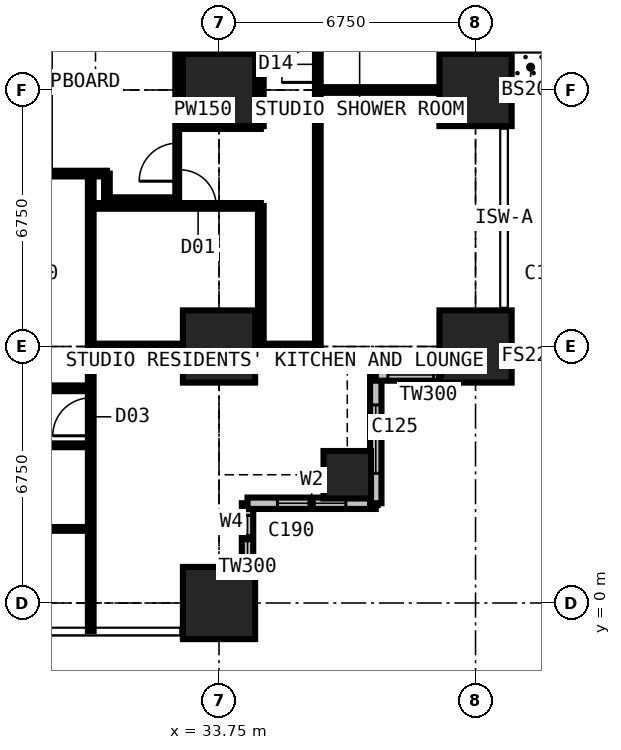
"""IFC4 building model, lengths in metres.
Left out: names, types, materials, properties, quantities, classifications, styles, units other than length and angle.
Written with IfcOpenShell. Run it as: python <this file> out.ifc"""

import sys

from ifc_helpers import new_model, si_unit, direction, frame, frame_2d, origin, origin_2d, place, context, subcontext, project, spatial, rectangle, extrude, element, fill, save


model = new_model("IFC4")
c1 = context("Model", 3, precision=1e-05, world=origin(), true_north=direction((0.0, 1.0)))
c2 = subcontext(c1, "Body", "Model", "MODEL_VIEW")
j1 = project(units=[si_unit("LENGTHUNIT", "METRE"), si_unit("PLANEANGLEUNIT", "RADIAN")], contexts=[c1])
p1 = place(None, origin())
s1 = spatial("IfcSite", under=j1, at=p1, CompositionType="ELEMENT")
p2 = place(p1, origin())
s2 = spatial("IfcBuilding", under=s1, at=p2, CompositionType="ELEMENT")
p3 = place(p2, frame((0.0, 0.0, 18.0)))
s3 = spatial("IfcBuildingStorey", under=s2, at=p3, CompositionType="ELEMENT", Elevation=18.0)
for number, where, z_axis, x_axis in (
    (1, (33.75, 0.0, 0.0), (0.0, 0.0, 1.0), (1.0, 0.0, 0.0)),
    (2, (33.75, 6.75, 0.0), (0.0, 0.0, 1.0), (1.0, 0.0, 0.0)),
    (3, (33.75, 13.5, 0.0), (0.0, 0.0, 1.0), (1.0, 0.0, 0.0)),
):
    element("IfcColumn", number, at=place(p3, frame(where, z_axis=z_axis, x_axis=x_axis)), inside=s3, PredefinedType="COLUMN", context=c2, shape_type="SweptSolid", body=[
        extrude(rectangle(XDim=1.9, YDim=1.9, at=origin_2d()), origin(), (0.0, 0.0, 1.0), 3.6),
    ])
p4 = place(p3, frame((37.125, 3.375, 0.0), z_axis=(0.0, 0.0, 1.0), x_axis=(1.0, 0.0, 0.0)))
e4 = element("IfcColumn", 4, at=p4, inside=s3, PredefinedType="COLUMN", context=c2, shape_type="SweptSolid", body=[
    extrude(rectangle(XDim=1.25, YDim=1.25, at=origin_2d()), origin(), (0.0, 0.0, 1.0), 3.6),
])
for number, where, z_axis, x_axis in (
    (5, (40.5, 6.75, 0.0), (0.0, 0.0, 1.0), (1.0, 0.0, 0.0)),
    (6, (40.5, 13.5, 0.0), (0.0, 0.0, 1.0), (1.0, 0.0, 0.0)),
):
    element("IfcColumn", number, at=place(p3, frame(where, z_axis=z_axis, x_axis=x_axis)), inside=s3, PredefinedType="COLUMN", context=c2, shape_type="SweptSolid", body=[
        extrude(rectangle(XDim=1.9, YDim=1.9, at=origin_2d()), origin(), (0.0, 0.0, 1.0), 3.6),
    ])
p5 = place(p3, frame((41.25, 20.25, 0.0), z_axis=(0.0, 0.0, 1.0), x_axis=(0.0, -1.0, 0.0)))
e7 = element("IfcWall", 7, at=p5, inside=s3, PredefinedType="SOLIDWALL", context=c2, shape_type="SweptSolid", body=[
    extrude(rectangle(XDim=6.75, YDim=0.15, at=frame_2d((3.375, 0.0))), origin(), (0.0, 0.0, 1.0), 3.375),
])
p6 = place(p5, frame((0.996, 0.0, 0.0)))
e8 = element("IfcOpeningElement", 8, at=p6, cuts=e7, PredefinedType="OPENING", context=c2, shape_type="SweptSolid", body=[
    extrude(rectangle(XDim=1.0, YDim=2.2, at=frame_2d((0.5, 1.1))), frame((0.0, 0.085, 0.0), z_axis=(0.0, -1.0, 0.0), x_axis=(1.0, 0.0, 0.0)), (0.0, 0.0, 1.0), 0.17),
])
p7 = place(p5, frame((2.042, 0.0, 0.9)))
e9 = element("IfcOpeningElement", 9, at=p7, cuts=e7, PredefinedType="OPENING", context=c2, shape_type="SweptSolid", body=[
    extrude(rectangle(XDim=1.2, YDim=1.8, at=frame_2d((0.6, 0.9))), frame((0.0, 0.085, 0.0), z_axis=(0.0, -1.0, 0.0), x_axis=(1.0, 0.0, 0.0)), (0.0, 0.0, 1.0), 0.17),
])
p8 = place(p5, frame((4.754, 0.0, 0.0)))
e10 = element("IfcOpeningElement", 10, at=p8, cuts=e7, PredefinedType="OPENING", context=c2, shape_type="SweptSolid", body=[
    extrude(rectangle(XDim=1.0, YDim=2.2, at=frame_2d((0.5, 1.1))), frame((0.0, 0.085, 0.0), z_axis=(0.0, -1.0, 0.0), x_axis=(1.0, 0.0, 0.0)), (0.0, 0.0, 1.0), 0.17),
])
p9 = place(p5, frame((3.508, 0.0, 0.9)))
e11 = element("IfcOpeningElement", 11, at=p9, cuts=e7, PredefinedType="OPENING", context=c2, shape_type="SweptSolid", body=[
    extrude(rectangle(XDim=1.2, YDim=1.8, at=frame_2d((0.6, 0.9))), frame((0.0, 0.085, 0.0), z_axis=(0.0, -1.0, 0.0), x_axis=(1.0, 0.0, 0.0)), (0.0, 0.0, 1.0), 0.17),
])
p10 = place(p3, frame((34.5, -0.75, 0.0), z_axis=(0.0, 0.0, 1.0), x_axis=(0.0, 1.0, 0.0)))
e12 = element("IfcWall", 12, at=p10, inside=s3, PredefinedType="SOLIDWALL", context=c2, shape_type="SweptSolid", body=[
    extrude(rectangle(XDim=3.375, YDim=0.3, at=frame_2d((1.688, 0.0))), origin(), (0.0, 0.0, 1.0), 3.375),
])
p11 = place(p10, frame((1.857, 0.0, 0.9)))
e13 = element("IfcOpeningElement", 13, at=p11, cuts=e12, PredefinedType="OPENING", context=c2, shape_type="SweptSolid", body=[
    extrude(rectangle(XDim=1.2, YDim=1.8, at=frame_2d((0.6, 0.9))), frame((0.0, 0.16, 0.0), z_axis=(0.0, -1.0, 0.0), x_axis=(1.0, 0.0, 0.0)), (0.0, 0.0, 1.0), 0.32),
])
p12 = place(p3, frame((34.5, 2.625, 0.0), z_axis=(0.0, 0.0, 1.0), x_axis=(1.0, 0.0, 0.0)))
e14 = element("IfcWall", 14, at=p12, inside=s3, PredefinedType="SOLIDWALL", context=c2, shape_type="SweptSolid", body=[
    extrude(rectangle(XDim=3.375, YDim=0.3, at=frame_2d((1.688, 0.0))), origin(), (0.0, 0.0, 1.0), 3.375),
])
p13 = place(p12, frame((0.788, 0.0, 0.6)))
e15 = element("IfcOpeningElement", 15, at=p13, cuts=e14, PredefinedType="OPENING", context=c2, shape_type="SweptSolid", body=[
    extrude(rectangle(XDim=1.8, YDim=2.1, at=frame_2d((0.9, 1.05))), frame((0.0, 0.16, 0.0), z_axis=(0.0, -1.0, 0.0), x_axis=(1.0, 0.0, 0.0)), (0.0, 0.0, 1.0), 0.32),
])
p14 = place(p3, frame((37.875, 2.625, 0.0), z_axis=(0.0, 0.0, 1.0), x_axis=(0.0, 1.0, 0.0)))
e16 = element("IfcWall", 16, at=p14, inside=s3, PredefinedType="SOLIDWALL", context=c2, shape_type="SweptSolid", body=[
    extrude(rectangle(XDim=3.375, YDim=0.3, at=frame_2d((1.688, 0.0))), origin(), (0.0, 0.0, 1.0), 3.375),
])
p15 = place(p14, frame((0.788, 0.0, 0.6)))
e17 = element("IfcOpeningElement", 17, at=p15, cuts=e16, PredefinedType="OPENING", context=c2, shape_type="SweptSolid", body=[
    extrude(rectangle(XDim=1.8, YDim=2.1, at=frame_2d((0.9, 1.05))), frame((0.0, 0.16, 0.0), z_axis=(0.0, -1.0, 0.0), x_axis=(1.0, 0.0, 0.0)), (0.0, 0.0, 1.0), 0.32),
])
p16 = place(p3, frame((37.875, 6.0, 0.0), z_axis=(0.0, 0.0, 1.0), x_axis=(1.0, 0.0, 0.0)))
e18 = element("IfcWall", 18, at=p16, inside=s3, PredefinedType="SOLIDWALL", context=c2, shape_type="SweptSolid", body=[
    extrude(rectangle(XDim=3.375, YDim=0.3, at=frame_2d((1.688, 0.0))), origin(), (0.0, 0.0, 1.0), 3.375),
])
p17 = place(p16, frame((0.317, 0.0, 0.9)))
e19 = element("IfcOpeningElement", 19, at=p17, cuts=e18, PredefinedType="OPENING", context=c2, shape_type="SweptSolid", body=[
    extrude(rectangle(XDim=1.2, YDim=1.8, at=frame_2d((0.6, 0.9))), frame((0.0, 0.16, 0.0), z_axis=(0.0, -1.0, 0.0), x_axis=(1.0, 0.0, 0.0)), (0.0, 0.0, 1.0), 0.32),
])
p18 = place(p3, frame((6.75, 4.15, 0.0), z_axis=(0.0, 0.0, 1.0), x_axis=(1.0, 0.0, 0.0)))
e20 = element("IfcWall", 20, at=p18, inside=s3, PredefinedType="PARTITIONING", context=c2, shape_type="SweptSolid", body=[
    extrude(rectangle(XDim=23.625, YDim=0.1, at=frame_2d((11.812, 0.0))), origin(), (0.0, 0.0, 1.0), 3.375),
])
p19 = place(p18, frame((1.2, 0.0, 0.0)))
e21 = element("IfcOpeningElement", 21, at=p19, cuts=e20, PredefinedType="OPENING", context=c2, shape_type="SweptSolid", body=[
    extrude(rectangle(XDim=1.0, YDim=2.2, at=frame_2d((0.5, 1.1))), frame((0.0, 0.06, 0.0), z_axis=(0.0, -1.0, 0.0), x_axis=(1.0, 0.0, 0.0)), (0.0, 0.0, 1.0), 0.12),
])
p20 = place(p18, frame((3.575, 0.0, 0.0)))
e22 = element("IfcOpeningElement", 22, at=p20, cuts=e20, PredefinedType="OPENING", context=c2, shape_type="SweptSolid", body=[
    extrude(rectangle(XDim=0.95, YDim=2.2, at=frame_2d((0.475, 1.1))), frame((0.0, 0.06, 0.0), z_axis=(0.0, -1.0, 0.0), x_axis=(1.0, 0.0, 0.0)), (0.0, 0.0, 1.0), 0.12),
])
p21 = place(p18, frame((7.0, 0.0, 0.0)))
e23 = element("IfcOpeningElement", 23, at=p21, cuts=e20, PredefinedType="OPENING", context=c2, shape_type="SweptSolid", body=[
    extrude(rectangle(XDim=0.95, YDim=2.2, at=frame_2d((0.475, 1.1))), frame((0.0, 0.06, 0.0), z_axis=(0.0, -1.0, 0.0), x_axis=(1.0, 0.0, 0.0)), (0.0, 0.0, 1.0), 0.12),
])
p22 = place(p18, frame((10.375, 0.0, 0.0)))
e24 = element("IfcOpeningElement", 24, at=p22, cuts=e20, PredefinedType="OPENING", context=c2, shape_type="SweptSolid", body=[
    extrude(rectangle(XDim=0.95, YDim=2.2, at=frame_2d((0.475, 1.1))), frame((0.0, 0.06, 0.0), z_axis=(0.0, -1.0, 0.0), x_axis=(1.0, 0.0, 0.0)), (0.0, 0.0, 1.0), 0.12),
])
p23 = place(p18, frame((13.7, 0.0, 0.0)))
e25 = element("IfcOpeningElement", 25, at=p23, cuts=e20, PredefinedType="OPENING", context=c2, shape_type="SweptSolid", body=[
    extrude(rectangle(XDim=0.95, YDim=2.2, at=frame_2d((0.475, 1.1))), frame((0.0, 0.06, 0.0), z_axis=(0.0, -1.0, 0.0), x_axis=(1.0, 0.0, 0.0)), (0.0, 0.0, 1.0), 0.12),
])
p24 = place(p18, frame((17.125, 0.0, 0.0)))
e26 = element("IfcOpeningElement", 26, at=p24, cuts=e20, PredefinedType="OPENING", context=c2, shape_type="SweptSolid", body=[
    extrude(rectangle(XDim=0.95, YDim=2.2, at=frame_2d((0.475, 1.1))), frame((0.0, 0.06, 0.0), z_axis=(0.0, -1.0, 0.0), x_axis=(1.0, 0.0, 0.0)), (0.0, 0.0, 1.0), 0.12),
])
p25 = place(p18, frame((20.5, 0.0, 0.0)))
e27 = element("IfcOpeningElement", 27, at=p25, cuts=e20, PredefinedType="OPENING", context=c2, shape_type="SweptSolid", body=[
    extrude(rectangle(XDim=0.95, YDim=2.2, at=frame_2d((0.475, 1.1))), frame((0.0, 0.06, 0.0), z_axis=(0.0, -1.0, 0.0), x_axis=(1.0, 0.0, 0.0)), (0.0, 0.0, 1.0), 0.12),
])
p26 = place(p3, frame((10.125, 11.3, 0.0), z_axis=(0.0, 0.0, 1.0), x_axis=(1.0, 0.0, 0.0)))
e28 = element("IfcWall", 28, at=p26, inside=s3, PredefinedType="PARTITIONING", context=c2, shape_type="SweptSolid", body=[
    extrude(rectangle(XDim=20.675, YDim=0.15, at=frame_2d((10.337, 0.0))), origin(), (0.0, 0.0, 1.0), 3.375),
])
p27 = place(p26, frame((8.375, 0.0, 0.0)))
e29 = element("IfcOpeningElement", 29, at=p27, cuts=e28, PredefinedType="OPENING", context=c2, shape_type="SweptSolid", body=[
    extrude(rectangle(XDim=1.0, YDim=2.2, at=frame_2d((0.5, 1.1))), frame((0.0, 0.085, 0.0), z_axis=(0.0, -1.0, 0.0), x_axis=(1.0, 0.0, 0.0)), (0.0, 0.0, 1.0), 0.17),
])
p28 = place(p26, frame((10.975, 0.0, 0.0)))
e30 = element("IfcOpeningElement", 30, at=p28, cuts=e28, PredefinedType="OPENING", context=c2, shape_type="SweptSolid", body=[
    extrude(rectangle(XDim=1.0, YDim=2.2, at=frame_2d((0.5, 1.1))), frame((0.0, 0.085, 0.0), z_axis=(0.0, -1.0, 0.0), x_axis=(1.0, 0.0, 0.0)), (0.0, 0.0, 1.0), 0.17),
])
p29 = place(p26, frame((3.925, 0.0, 0.0)))
e31 = element("IfcOpeningElement", 31, at=p29, cuts=e28, PredefinedType="OPENING", context=c2, shape_type="SweptSolid", body=[
    extrude(rectangle(XDim=0.95, YDim=2.2, at=frame_2d((0.475, 1.1))), frame((0.0, 0.085, 0.0), z_axis=(0.0, -1.0, 0.0), x_axis=(1.0, 0.0, 0.0)), (0.0, 0.0, 1.0), 0.17),
])
p30 = place(p3, frame((22.988, 5.65, 0.0), z_axis=(0.0, 0.0, 1.0), x_axis=(1.0, 0.0, 0.0)))
e32 = element("IfcWall", 32, at=p30, inside=s3, PredefinedType="PARTITIONING", context=c2, shape_type="SweptSolid", body=[
    extrude(rectangle(XDim=7.387, YDim=0.15, at=frame_2d((3.694, 0.0))), origin(), (0.0, 0.0, 1.0), 3.375),
])
p31 = place(p30, frame((2.1, 0.0, 0.0)))
e33 = element("IfcOpeningElement", 33, at=p31, cuts=e32, PredefinedType="OPENING", context=c2, shape_type="SweptSolid", body=[
    extrude(rectangle(XDim=0.95, YDim=2.2, at=frame_2d((0.475, 1.1))), frame((0.0, 0.085, 0.0), z_axis=(0.0, -1.0, 0.0), x_axis=(1.0, 0.0, 0.0)), (0.0, 0.0, 1.0), 0.17),
])
p32 = place(p3, frame((28.375, 1.95, 0.0), z_axis=(0.0, 0.0, 1.0), x_axis=(1.0, 0.0, 0.0)))
e34 = element("IfcWall", 34, at=p32, inside=s3, PredefinedType="PARTITIONING", context=c2, shape_type="SweptSolid", body=[
    extrude(rectangle(XDim=2.0, YDim=0.1, at=frame_2d((1.0, 0.0))), origin(), (0.0, 0.0, 1.0), 3.375),
])
p33 = place(p3, frame((30.375, -0.734, 0.0), z_axis=(0.0, 0.0, 1.0), x_axis=(0.0, 1.0, 0.0)))
e35 = element("IfcWall", 35, at=p33, inside=s3, PredefinedType="PARTITIONING", context=c2, shape_type="SweptSolid", body=[
    extrude(rectangle(XDim=12.034, YDim=0.15, at=frame_2d((6.017, 0.0))), origin(), (0.0, 0.0, 1.0), 3.375),
])
p34 = place(p33, frame((5.134, 0.0, 0.0)))
e36 = element("IfcOpeningElement", 36, at=p34, cuts=e35, PredefinedType="OPENING", context=c2, shape_type="SweptSolid", body=[
    extrude(rectangle(XDim=1.0, YDim=2.2, at=frame_2d((0.5, 1.1))), frame((0.0, 0.085, 0.0), z_axis=(0.0, -1.0, 0.0), x_axis=(1.0, 0.0, 0.0)), (0.0, 0.0, 1.0), 0.17),
])
p35 = place(p3, frame((30.375, 6.75, 0.0), z_axis=(0.0, 0.0, 1.0), x_axis=(1.0, 0.0, 0.0)))
e37 = element("IfcWall", 37, at=p35, inside=s3, PredefinedType="PARTITIONING", context=c2, shape_type="SweptSolid", body=[
    extrude(rectangle(XDim=5.975, YDim=0.15, at=frame_2d((2.988, 0.0))), origin(), (0.0, 0.0, 1.0), 2.877),
])
p36 = place(p3, frame((30.375, 10.45, 0.0), z_axis=(0.0, 0.0, 1.0), x_axis=(1.0, 0.0, 0.0)))
e38 = element("IfcWall", 38, at=p36, inside=s3, PredefinedType="PARTITIONING", context=c2, shape_type="SweptSolid", body=[
    extrude(rectangle(XDim=4.475, YDim=0.15, at=frame_2d((2.238, 0.0))), origin(), (0.0, 0.0, 1.0), 3.375),
])
p37 = place(p36, frame((2.35, 0.0, 0.0)))
e39 = element("IfcOpeningElement", 39, at=p37, cuts=e38, PredefinedType="OPENING", context=c2, shape_type="SweptSolid", body=[
    extrude(rectangle(XDim=0.95, YDim=2.2, at=frame_2d((0.475, 1.1))), frame((0.0, 0.085, 0.0), z_axis=(0.0, -1.0, 0.0), x_axis=(1.0, 0.0, 0.0)), (0.0, 0.0, 1.0), 0.17),
])
p38 = place(p3, frame((30.8, 10.6, 0.0), z_axis=(0.0, 0.0, 1.0), x_axis=(0.0, 1.0, 0.0)))
e40 = element("IfcWall", 40, at=p38, inside=s3, PredefinedType="PARTITIONING", context=c2, shape_type="SweptSolid", body=[
    extrude(rectangle(XDim=0.7, YDim=0.15, at=frame_2d((0.35, 0.0))), origin(), (0.0, 0.0, 1.0), 3.375),
])
p39 = place(p3, frame((30.8, 10.6, 0.0), z_axis=(0.0, 0.0, 1.0), x_axis=(1.0, 0.0, 0.0)))
e41 = element("IfcWall", 41, at=p39, inside=s3, PredefinedType="PARTITIONING", context=c2, shape_type="SweptSolid", body=[
    extrude(rectangle(XDim=1.85, YDim=0.15, at=frame_2d((0.925, 0.0))), origin(), (0.0, 0.0, 1.0), 3.375),
])
p40 = place(p3, frame((32.65, 10.6, 0.0), z_axis=(0.0, 0.0, 1.0), x_axis=(0.0, 1.0, 0.0)))
e42 = element("IfcWall", 42, at=p40, inside=s3, PredefinedType="SHEAR", context=c2, shape_type="SweptSolid", body=[
    extrude(rectangle(XDim=9.3, YDim=0.1, at=frame_2d((4.65, 0.0))), origin(), (0.0, 0.0, 1.0), 3.375),
])
p41 = place(p40, frame((0.5, 0.0, 0.0)))
e43 = element("IfcOpeningElement", 43, at=p41, cuts=e42, PredefinedType="OPENING", context=c2, shape_type="SweptSolid", body=[
    extrude(rectangle(XDim=1.0, YDim=2.2, at=frame_2d((0.5, 1.1))), frame((0.0, 0.06, 0.0), z_axis=(0.0, -1.0, 0.0), x_axis=(1.0, 0.0, 0.0)), (0.0, 0.0, 1.0), 0.12),
])
p42 = place(p3, frame((32.65, 12.55, 0.0), z_axis=(0.0, 0.0, 1.0), x_axis=(1.0, 0.0, 0.0)))
e44 = element("IfcWall", 44, at=p42, inside=s3, PredefinedType="PARTITIONING", context=c2, shape_type="SweptSolid", body=[
    extrude(rectangle(XDim=2.2, YDim=0.15, at=frame_2d((1.1, 0.0))), origin(), (0.0, 0.0, 1.0), 3.375),
])
p43 = place(p3, frame((34.85, 6.75, 0.0), z_axis=(0.0, 0.0, 1.0), x_axis=(0.0, 1.0, 0.0)))
e45 = element("IfcWall", 45, at=p43, inside=s3, PredefinedType="PARTITIONING", context=c2, shape_type="SweptSolid", body=[
    extrude(rectangle(XDim=3.7, YDim=0.15, at=frame_2d((1.85, 0.0))), origin(), (0.0, 0.0, 1.0), 3.375),
])
p44 = place(p3, frame((34.85, 12.55, 0.0), z_axis=(0.0, 0.0, 1.0), x_axis=(0.0, 1.0, 0.0)))
e46 = element("IfcWall", 46, at=p44, inside=s3, PredefinedType="PARTITIONING", context=c2, shape_type="SweptSolid", body=[
    extrude(rectangle(XDim=17.825, YDim=0.15, at=frame_2d((8.913, 0.0))), origin(), (0.0, 0.0, 1.0), 3.375),
])
p45 = place(p44, frame((8.65, 0.0, 0.0)))
e47 = element("IfcOpeningElement", 47, at=p45, cuts=e46, PredefinedType="OPENING", context=c2, shape_type="SweptSolid", body=[
    extrude(rectangle(XDim=0.95, YDim=2.2, at=frame_2d((0.475, 1.1))), frame((0.0, 0.085, 0.0), z_axis=(0.0, -1.0, 0.0), x_axis=(1.0, 0.0, 0.0)), (0.0, 0.0, 1.0), 0.17),
])
p46 = place(p3, frame((36.35, 6.75, 0.0), z_axis=(0.0, 0.0, 1.0), x_axis=(0.0, 1.0, 0.0)))
e48 = element("IfcWall", 48, at=p46, inside=s3, PredefinedType="PARTITIONING", context=c2, shape_type="SweptSolid", body=[
    extrude(rectangle(XDim=23.625, YDim=0.15, at=frame_2d((11.812, 0.0))), origin(), (0.0, 0.0, 1.0), 3.375),
])
p47 = place(p46, frame((18.475, 0.0, 0.0)))
e49 = element("IfcOpeningElement", 49, at=p47, cuts=e48, PredefinedType="OPENING", context=c2, shape_type="SweptSolid", body=[
    extrude(rectangle(XDim=0.95, YDim=2.2, at=frame_2d((0.475, 1.1))), frame((0.0, 0.085, 0.0), z_axis=(0.0, -1.0, 0.0), x_axis=(1.0, 0.0, 0.0)), (0.0, 0.0, 1.0), 0.17),
])
p48 = place(p46, frame((11.725, 0.0, 0.0)))
e50 = element("IfcOpeningElement", 50, at=p48, cuts=e48, PredefinedType="OPENING", context=c2, shape_type="SweptSolid", body=[
    extrude(rectangle(XDim=0.95, YDim=2.2, at=frame_2d((0.475, 1.1))), frame((0.0, 0.085, 0.0), z_axis=(0.0, -1.0, 0.0), x_axis=(1.0, 0.0, 0.0)), (0.0, 0.0, 1.0), 0.17),
])
p49 = place(p46, frame((6.95, 0.0, 0.0)))
e51 = element("IfcOpeningElement", 51, at=p49, cuts=e48, PredefinedType="OPENING", context=c2, shape_type="SweptSolid", body=[
    extrude(rectangle(XDim=0.95, YDim=2.2, at=frame_2d((0.475, 1.1))), frame((0.0, 0.085, 0.0), z_axis=(0.0, -1.0, 0.0), x_axis=(1.0, 0.0, 0.0)), (0.0, 0.0, 1.0), 0.17),
])
p50 = place(p3, frame((36.35, 13.5, 0.0), z_axis=(0.0, 0.0, 1.0), x_axis=(1.0, 0.0, 0.0)))
e52 = element("IfcWall", 52, at=p50, inside=s3, PredefinedType="PARTITIONING", context=c2, shape_type="SweptSolid", body=[
    extrude(rectangle(XDim=4.884, YDim=0.15, at=frame_2d((2.442, 0.0))), origin(), (0.0, 0.0, 1.0), 2.877),
])
p51 = place(p8, origin())
e53 = element("IfcDoor", 53, at=p51, inside=s3, OperationType="SINGLE_SWING_RIGHT", PredefinedType="DOOR", context=c2, shape_type="SweptSolid", body=[
    extrude(rectangle(XDim=1.0, YDim=2.2, at=frame_2d((0.5, 1.1))), frame((0.0, 0.025, 0.0), z_axis=(0.0, -1.0, 0.0), x_axis=(1.0, 0.0, 0.0)), (0.0, 0.0, 1.0), 0.05),
])
fill(e10, e53)
p52 = place(p11, origin())
e54 = element("IfcWindow", 54, at=p52, inside=s3, PartitioningType="SINGLE_PANEL", PredefinedType="WINDOW", context=c2, shape_type="SweptSolid", body=[
    extrude(rectangle(XDim=1.2, YDim=1.8, at=frame_2d((0.6, 0.9))), frame((0.0, 0.03, 0.0), z_axis=(0.0, -1.0, 0.0), x_axis=(1.0, 0.0, 0.0)), (0.0, 0.0, 1.0), 0.06),
])
fill(e13, e54)
p53 = place(p13, origin())
e55 = element("IfcWindow", 55, at=p53, inside=s3, PartitioningType="SINGLE_PANEL", PredefinedType="WINDOW", context=c2, shape_type="SweptSolid", body=[
    extrude(rectangle(XDim=1.8, YDim=2.1, at=frame_2d((0.9, 1.05))), frame((0.0, 0.03, 0.0), z_axis=(0.0, -1.0, 0.0), x_axis=(1.0, 0.0, 0.0)), (0.0, 0.0, 1.0), 0.06),
])
fill(e15, e55)
p54 = place(p15, origin())
e56 = element("IfcWindow", 56, at=p54, inside=s3, PartitioningType="SINGLE_PANEL", PredefinedType="WINDOW", context=c2, shape_type="SweptSolid", body=[
    extrude(rectangle(XDim=1.8, YDim=2.1, at=frame_2d((0.9, 1.05))), frame((0.0, 0.03, 0.0), z_axis=(0.0, -1.0, 0.0), x_axis=(1.0, 0.0, 0.0)), (0.0, 0.0, 1.0), 0.06),
])
fill(e17, e56)
p55 = place(p17, origin())
e57 = element("IfcWindow", 57, at=p55, inside=s3, PartitioningType="SINGLE_PANEL", PredefinedType="WINDOW", context=c2, shape_type="SweptSolid", body=[
    extrude(rectangle(XDim=1.2, YDim=1.8, at=frame_2d((0.6, 0.9))), frame((0.0, 0.03, 0.0), z_axis=(0.0, -1.0, 0.0), x_axis=(1.0, 0.0, 0.0)), (0.0, 0.0, 1.0), 0.06),
])
fill(e19, e57)
p56 = place(p34, origin())
e58 = element("IfcDoor", 58, at=p56, inside=s3, OperationType="SINGLE_SWING_LEFT", PredefinedType="DOOR", context=c2, shape_type="SweptSolid", body=[
    extrude(rectangle(XDim=1.0, YDim=2.2, at=frame_2d((0.5, 1.1))), frame((0.0, 0.025, 0.0), z_axis=(0.0, -1.0, 0.0), x_axis=(1.0, 0.0, 0.0)), (0.0, 0.0, 1.0), 0.05),
])
fill(e36, e58)
p57 = place(p49, origin())
e59 = element("IfcDoor", 59, at=p57, inside=s3, OperationType="SINGLE_SWING_LEFT", PredefinedType="DOOR", context=c2, shape_type="SweptSolid", body=[
    extrude(rectangle(XDim=0.95, YDim=2.2, at=frame_2d((0.475, 1.1))), frame((0.0, 0.025, 0.0), z_axis=(0.0, -1.0, 0.0), x_axis=(1.0, 0.0, 0.0)), (0.0, 0.0, 1.0), 0.05),
])
fill(e51, e59)
p58 = place(p41, origin())
e60 = element("IfcDoor", 60, at=p58, inside=s3, OperationType="SINGLE_SWING_LEFT", PredefinedType="DOOR", context=c2, shape_type="SweptSolid", body=[
    extrude(rectangle(XDim=1.0, YDim=2.2, at=frame_2d((0.5, 1.1))), frame((0.0, 0.025, 0.0), z_axis=(0.0, -1.0, 0.0), x_axis=(1.0, 0.0, 0.0)), (0.0, 0.0, 1.0), 0.05),
])
fill(e43, e60)
p59 = place(p37, origin())
e61 = element("IfcDoor", 61, at=p59, inside=s3, OperationType="SINGLE_SWING_LEFT", PredefinedType="DOOR", context=c2, shape_type="SweptSolid", body=[
    extrude(rectangle(XDim=0.95, YDim=2.2, at=frame_2d((0.475, 1.1))), frame((0.0, 0.025, 0.0), z_axis=(0.0, -1.0, 0.0), x_axis=(1.0, 0.0, 0.0)), (0.0, 0.0, 1.0), 0.05),
])
fill(e39, e61)
save(model, sys.argv[1])
